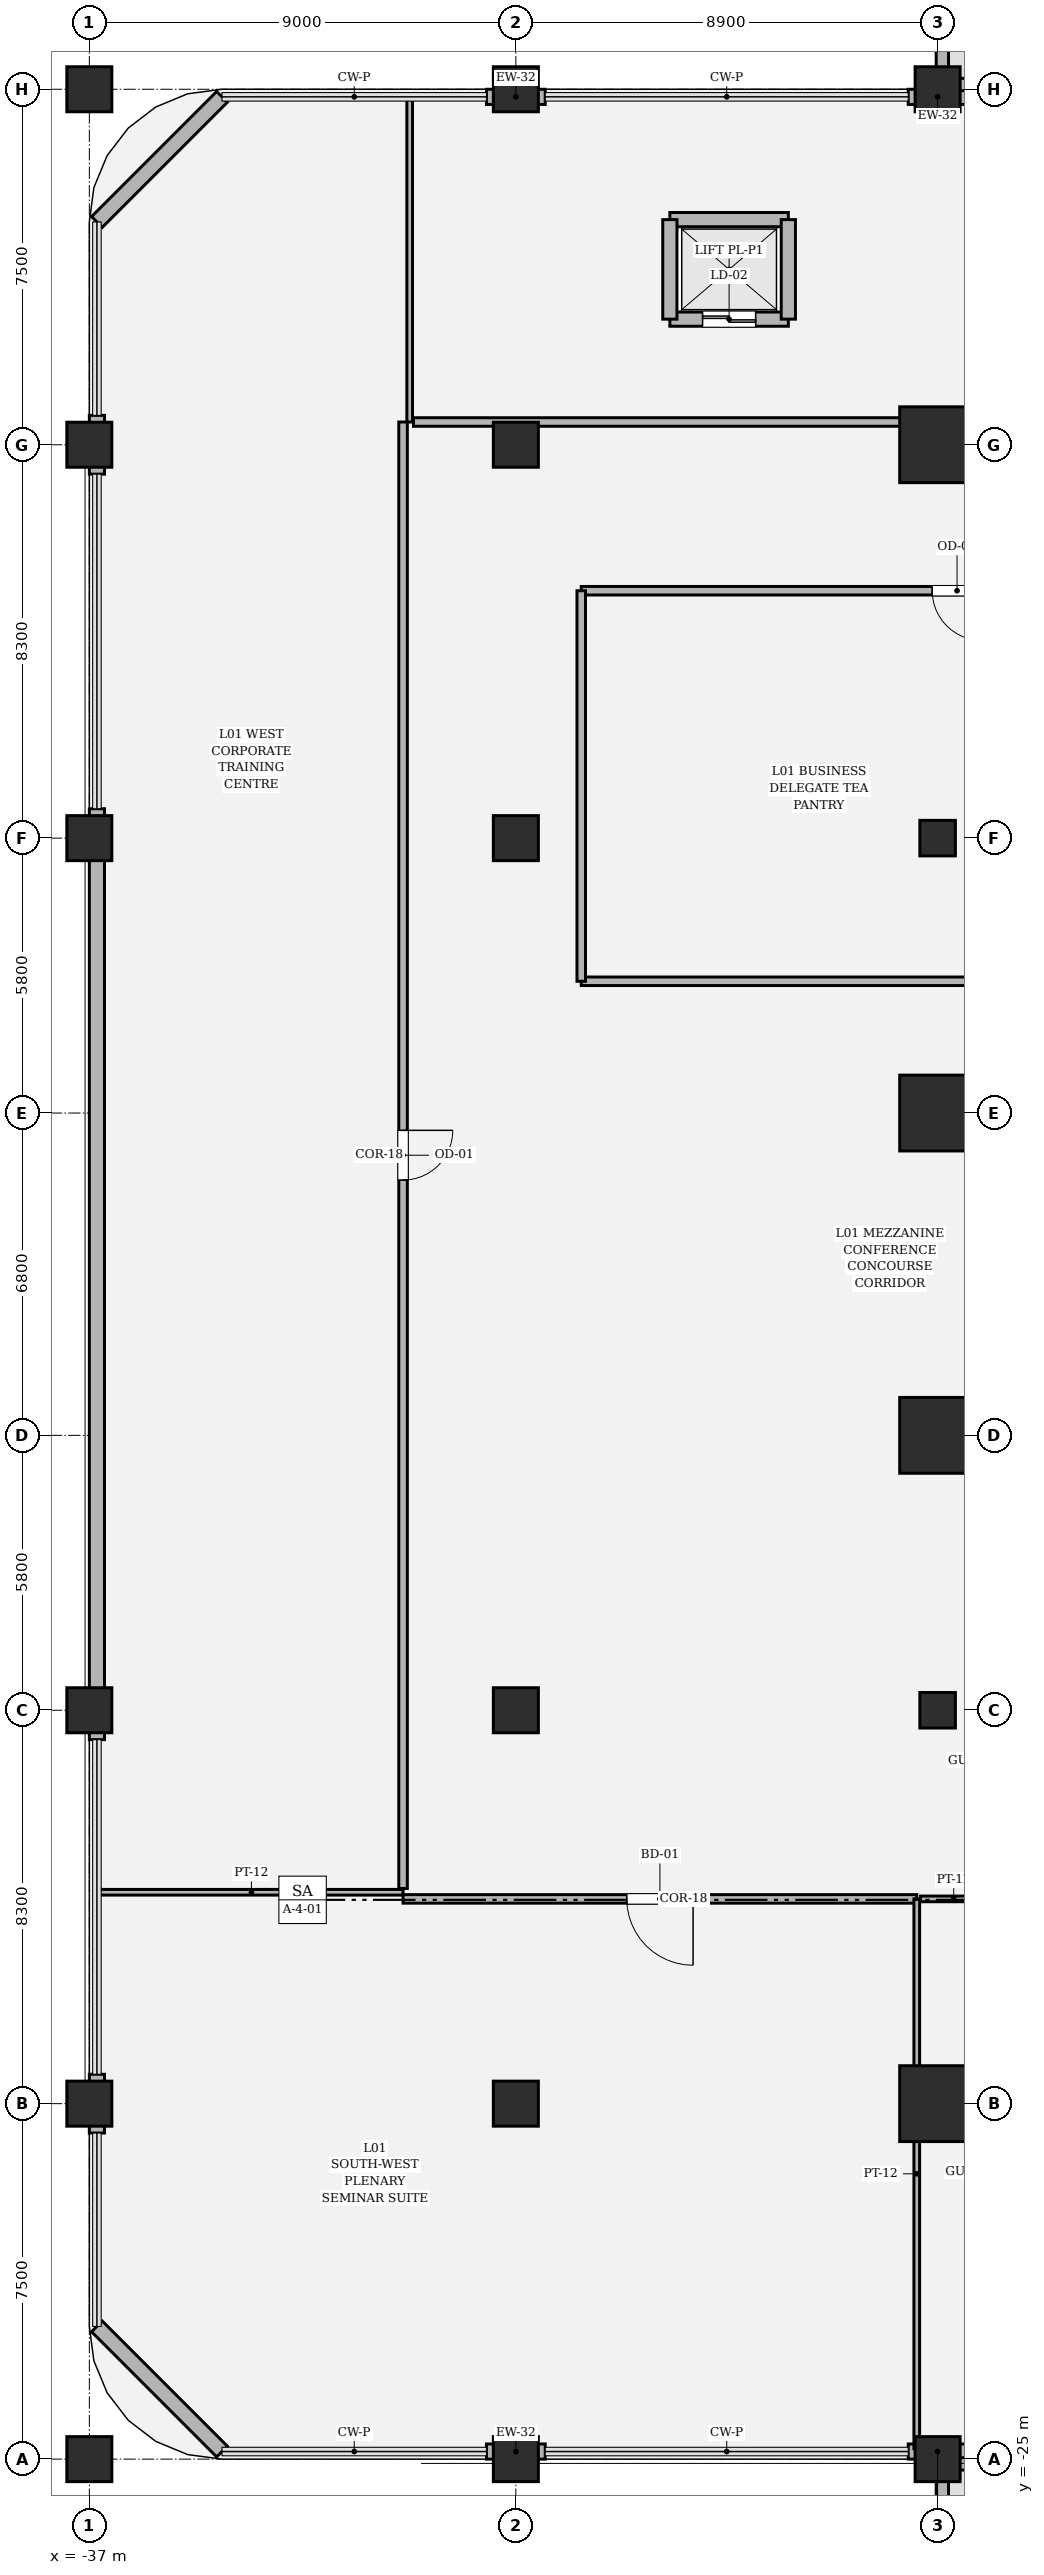
"""IFC4 building model, lengths in metres.
Left out: names, types, materials, properties, quantities, classifications, styles, units other than length and angle.
Written with IfcOpenShell. Run it as: python <this file> out.ifc"""

import sys

from ifc_helpers import new_model, si_unit, direction, frame, frame_2d, origin, origin_2d, place, context, subcontext, project, spatial, rectangle, hollow_rectangle, circle, extrude, element, fill, save


model = new_model("IFC4")
c1 = context("Model", 3, precision=1e-05, world=origin(), true_north=direction((0.0, 1.0)))
c2 = subcontext(c1, "Body", "Model", "MODEL_VIEW")
j1 = project(units=[si_unit("LENGTHUNIT", "METRE"), si_unit("PLANEANGLEUNIT", "RADIAN")], contexts=[c1])
p1 = place(None, origin())
s1 = spatial("IfcSite", under=j1, at=p1, CompositionType="ELEMENT")
p2 = place(p1, origin())
s2 = spatial("IfcBuilding", under=s1, at=p2, CompositionType="ELEMENT")
p3 = place(p2, frame((0.0, 0.0, 6.0)))
s3 = spatial("IfcBuildingStorey", under=s2, at=p3, CompositionType="ELEMENT", Elevation=6.0)
for number, where, z_axis, x_axis in (
    (1, (-19.1, -17.5, 0.0), (0.0, 0.0, 1.0), (1.0, 0.0, 0.0)),
    (2, (-19.1, 17.5, 0.0), (0.0, 0.0, 1.0), (1.0, 0.0, 0.0)),
    (3, (-19.1, 3.4, 0.0), (0.0, 0.0, 1.0), (1.0, 0.0, 0.0)),
    (4, (-19.1, -3.4, 0.0), (0.0, 0.0, 1.0), (1.0, 0.0, 0.0)),
):
    element("IfcColumn", number, at=place(p3, frame(where, z_axis=z_axis, x_axis=x_axis)), inside=s3, PredefinedType="COLUMN", context=c2, shape_type="SweptSolid", body=[
        extrude(hollow_rectangle(XDim=1.6, YDim=1.6, WallThickness=0.05, at=origin_2d()), origin(), (0.0, 0.0, 1.0), 5.4),
    ])
for number, where, z_axis, x_axis in (
    (5, (-37.0, -25.0, 0.0), (0.0, 0.0, 1.0), (1.0, 0.0, 0.0)),
    (6, (-28.0, -25.0, 0.0), (0.0, 0.0, 1.0), (1.0, 0.0, 0.0)),
    (7, (-19.1, -25.0, 0.0), (0.0, 0.0, 1.0), (1.0, 0.0, 0.0)),
    (8, (-37.0, -17.5, 0.0), (0.0, 0.0, 1.0), (1.0, 0.0, 0.0)),
    (9, (-28.0, -17.5, 0.0), (0.0, 0.0, 1.0), (1.0, 0.0, 0.0)),
    (10, (-37.0, -9.2, 0.0), (0.0, 0.0, 1.0), (1.0, 0.0, 0.0)),
    (11, (-37.0, 9.2, 0.0), (0.0, 0.0, 1.0), (1.0, 0.0, 0.0)),
    (12, (-37.0, 17.5, 0.0), (0.0, 0.0, 1.0), (1.0, 0.0, 0.0)),
    (13, (-28.0, 17.5, 0.0), (0.0, 0.0, 1.0), (1.0, 0.0, 0.0)),
    (14, (-37.0, 25.0, 0.0), (0.0, 0.0, 1.0), (1.0, 0.0, 0.0)),
    (15, (-28.0, 25.0, 0.0), (0.0, 0.0, 1.0), (1.0, 0.0, 0.0)),
    (16, (-19.1, 25.0, 0.0), (0.0, 0.0, 1.0), (1.0, 0.0, 0.0)),
    (17, (-28.0, -9.2, 0.0), (0.0, 0.0, 1.0), (1.0, 0.0, 0.0)),
    (18, (-28.0, 9.2, 0.0), (0.0, 0.0, 1.0), (1.0, 0.0, 0.0)),
):
    element("IfcColumn", number, at=place(p3, frame(where, z_axis=z_axis, x_axis=x_axis)), inside=s3, PredefinedType="COLUMN", context=c2, shape_type="SweptSolid", body=[
        extrude(rectangle(XDim=0.95, YDim=0.95, at=origin_2d()), origin(), (0.0, 0.0, 1.0), 5.4),
    ])
for number, where, z_axis, x_axis in (
    (19, (-19.1, -9.2, 0.0), (0.0, 0.0, 1.0), (1.0, 0.0, 0.0)),
    (20, (-19.1, 9.2, 0.0), (0.0, 0.0, 1.0), (1.0, 0.0, 0.0)),
):
    element("IfcColumn", number, at=place(p3, frame(where, z_axis=z_axis, x_axis=x_axis)), inside=s3, PredefinedType="PILASTER", context=c2, shape_type="SweptSolid", body=[
        extrude(circle(Radius=0.375, at=origin_2d()), origin(), (0.0, 0.0, 1.0), 5.4),
    ])
for number, where, z_axis, x_axis in (
    (21, (-28.62, -24.84, 0.0), (0.0, 0.0, 1.0), (1.0, 0.0, 0.0)),
    (22, (-27.38, 24.84, 0.0), (0.0, 0.0, 1.0), (-1.0, 0.0, 0.0)),
):
    element("IfcWall", number, at=place(p3, frame(where, z_axis=z_axis, x_axis=x_axis)), inside=s3, PredefinedType="SOLIDWALL", context=c2, shape_type="SweptSolid", body=[
        extrude(rectangle(XDim=1.24, YDim=0.32, at=frame_2d((0.62, 0.0))), origin(), (0.0, 0.0, 1.0), 4.414),
    ])
for number, where, z_axis, x_axis in (
    (23, (-19.72, -24.84, 0.0), (0.0, 0.0, 1.0), (1.0, 0.0, 0.0)),
    (24, (-18.48, 24.84, 0.0), (0.0, 0.0, 1.0), (-1.0, 0.0, 0.0)),
):
    element("IfcWall", number, at=place(p3, frame(where, z_axis=z_axis, x_axis=x_axis)), inside=s3, PredefinedType="SOLIDWALL", context=c2, shape_type="SweptSolid", body=[
        extrude(rectangle(XDim=1.24, YDim=0.32, at=frame_2d((0.62, 0.0))), origin(), (0.0, 0.0, 1.0), 4.414),
    ])
p4 = place(p3, frame((-36.84, -9.82, 0.0), z_axis=(0.0, 0.0, 1.0), x_axis=(0.0, 1.0, 0.0)))
e25 = element("IfcWall", 25, at=p4, inside=s3, PredefinedType="SOLIDWALL", context=c2, shape_type="SweptSolid", body=[
    extrude(rectangle(XDim=19.64, YDim=0.32, at=frame_2d((9.82, 0.0))), origin(), (0.0, 0.0, 1.0), 4.414),
])
for number, where, z_axis, x_axis in (
    (26, (-36.84, -18.12, 0.0), (0.0, 0.0, 1.0), (0.0, 1.0, 0.0)),
    (27, (-36.84, 16.88, 0.0), (0.0, 0.0, 1.0), (0.0, 1.0, 0.0)),
):
    element("IfcWall", number, at=place(p3, frame(where, z_axis=z_axis, x_axis=x_axis)), inside=s3, PredefinedType="SOLIDWALL", context=c2, shape_type="SweptSolid", body=[
        extrude(rectangle(XDim=1.24, YDim=0.32, at=frame_2d((0.62, 0.0))), origin(), (0.0, 0.0, 1.0), 4.414),
    ])
for number, where, z_axis, x_axis in (
    (28, (-34.2, -24.84, 0.0), (0.0, 0.0, 1.0), (-0.707, 0.707, 0.0)),
    (29, (-36.84, 22.2, 0.0), (0.0, 0.0, 1.0), (0.707, 0.707, 0.0)),
):
    element("IfcWall", number, at=place(p3, frame(where, z_axis=z_axis, x_axis=x_axis)), inside=s3, PredefinedType="SOLIDWALL", context=c2, shape_type="SweptSolid", body=[
        extrude(rectangle(XDim=3.734, YDim=0.32, at=frame_2d((1.867, 0.0))), origin(), (0.0, 0.0, 1.0), 4.564),
    ])
p5 = place(p3, frame((-19.0, -25.1, 0.0), z_axis=(0.0, 0.0, 1.0), x_axis=(0.0, -1.0, 0.0)))
e30 = element("IfcWall", 30, at=p5, inside=s3, PredefinedType="PARAPET", context=c2, shape_type="SweptSolid", body=[
    extrude(rectangle(XDim=2.52, YDim=0.26, at=frame_2d((1.26, 0.0))), origin(), (0.0, 0.0, 1.0), 1.15),
])
for number, where, z_axis, x_axis in (
    (31, (19.0, -25.1, 0.0), (0.0, 0.0, 1.0), (-1.0, 0.0, 0.0)),
    (32, (-19.0, 25.1, 0.0), (0.0, 0.0, 1.0), (1.0, 0.0, 0.0)),
):
    element("IfcWall", number, at=place(p3, frame(where, z_axis=z_axis, x_axis=x_axis)), inside=s3, PredefinedType="PARAPET", context=c2, shape_type="SweptSolid", body=[
        extrude(rectangle(XDim=38.0, YDim=0.26, at=frame_2d((19.0, 0.0))), origin(), (0.0, 0.0, 1.0), 1.15),
    ])
p6 = place(p3, frame((-19.0, 27.62, 0.0), z_axis=(0.0, 0.0, 1.0), x_axis=(0.0, -1.0, 0.0)))
e33 = element("IfcWall", 33, at=p6, inside=s3, PredefinedType="PARAPET", context=c2, shape_type="SweptSolid", body=[
    extrude(rectangle(XDim=2.52, YDim=0.26, at=frame_2d((1.26, 0.0))), origin(), (0.0, 0.0, 1.0), 1.15),
])
p7 = place(p3, frame((-24.75, 20.15, 0.0), z_axis=(0.0, 0.0, 1.0), x_axis=(1.0, 0.0, 0.0)))
e34 = element("IfcWall", 34, at=p7, inside=s3, PredefinedType="SOLIDWALL", context=c2, shape_type="SweptSolid", body=[
    extrude(rectangle(XDim=2.5, YDim=0.3, at=frame_2d((1.25, 0.0))), origin(), (0.0, 0.0, 1.0), 5.12),
])
p8 = place(p7, frame((0.69, 0.0, 0.0)))
e35 = element("IfcOpeningElement", 35, at=p8, cuts=e34, PredefinedType="OPENING", context=c2, shape_type="SweptSolid", body=[
    extrude(rectangle(XDim=1.12, YDim=2.25, at=frame_2d((0.56, 1.125))), frame((0.0, 0.16, 0.0), z_axis=(0.0, -1.0, 0.0), x_axis=(1.0, 0.0, 0.0)), (0.0, 0.0, 1.0), 0.32),
])
p9 = place(p3, frame((-24.75, 22.25, 0.0), z_axis=(0.0, 0.0, 1.0), x_axis=(1.0, 0.0, 0.0)))
e36 = element("IfcWall", 36, at=p9, inside=s3, PredefinedType="SOLIDWALL", context=c2, shape_type="SweptSolid", body=[
    extrude(rectangle(XDim=2.5, YDim=0.3, at=frame_2d((1.25, 0.0))), origin(), (0.0, 0.0, 1.0), 5.12),
])
for number, where, z_axis, x_axis in (
    (37, (-24.75, 20.15, 0.0), (0.0, 0.0, 1.0), (0.0, 1.0, 0.0)),
    (38, (-22.25, 20.15, 0.0), (0.0, 0.0, 1.0), (0.0, 1.0, 0.0)),
):
    element("IfcWall", number, at=place(p3, frame(where, z_axis=z_axis, x_axis=x_axis)), inside=s3, PredefinedType="SOLIDWALL", context=c2, shape_type="SweptSolid", body=[
        extrude(rectangle(XDim=2.1, YDim=0.3, at=frame_2d((1.05, 0.0))), origin(), (0.0, 0.0, 1.0), 5.12),
    ])
p10 = place(p3, frame((-36.78, -13.04, 0.0), z_axis=(0.0, 0.0, 1.0), x_axis=(1.0, 0.0, 0.0)))
e39 = element("IfcWall", 39, at=p10, inside=s3, PredefinedType="PARTITIONING", context=c2, shape_type="SweptSolid", body=[
    extrude(rectangle(XDim=6.4, YDim=0.12, at=frame_2d((3.2, 0.0))), origin(), (0.0, 0.0, 1.0), 5.12),
])
p11 = place(p3, frame((-30.38, -13.18, 0.0), z_axis=(0.0, 0.0, 1.0), x_axis=(1.0, 0.0, 0.0)))
e40 = element("IfcWall", 40, at=p11, inside=s3, PredefinedType="PARTITIONING", context=c2, shape_type="SweptSolid", body=[
    extrude(rectangle(XDim=10.84, YDim=0.18, at=frame_2d((5.42, 0.0))), origin(), (0.0, 0.0, 1.0), 4.414),
])
p12 = place(p11, frame((4.72, 0.0, 0.0)))
e41 = element("IfcOpeningElement", 41, at=p12, cuts=e40, PredefinedType="OPENING", context=c2, shape_type="SweptSolid", body=[
    extrude(rectangle(XDim=1.4, YDim=2.25, at=frame_2d((0.7, 1.125))), frame((0.0, 0.1, 0.0), z_axis=(0.0, -1.0, 0.0), x_axis=(1.0, 0.0, 0.0)), (0.0, 0.0, 1.0), 0.2),
])
p13 = place(p3, frame((-19.54, -13.18, 0.0), z_axis=(0.0, 0.0, 1.0), x_axis=(0.0, -1.0, 0.0)))
e42 = element("IfcWall", 42, at=p13, inside=s3, PredefinedType="PARTITIONING", context=c2, shape_type="SweptSolid", body=[
    extrude(rectangle(XDim=11.6, YDim=0.12, at=frame_2d((5.8, 0.0))), origin(), (0.0, 0.0, 1.0), 4.414),
])
p14 = place(p3, frame((-19.46, -13.18, 0.0), z_axis=(0.0, 0.0, 1.0), x_axis=(1.0, 0.0, 0.0)))
e43 = element("IfcWall", 43, at=p14, inside=s3, PredefinedType="PARTITIONING", context=c2, shape_type="SweptSolid", body=[
    extrude(rectangle(XDim=1.4, YDim=0.12, at=frame_2d((0.7, 0.0))), origin(), (0.0, 0.0, 1.0), 4.414),
])
p15 = place(p3, frame((-30.24, 24.78, 0.0), z_axis=(0.0, 0.0, 1.0), x_axis=(0.0, -1.0, 0.0)))
e44 = element("IfcWall", 44, at=p15, inside=s3, PredefinedType="PARTITIONING", context=c2, shape_type="SweptSolid", body=[
    extrude(rectangle(XDim=6.8, YDim=0.12, at=frame_2d((3.4, 0.0))), origin(), (0.0, 0.0, 1.0), 5.12),
])
p16 = place(p3, frame((-30.38, 17.98, 0.0), z_axis=(0.0, 0.0, 1.0), x_axis=(0.0, -1.0, 0.0)))
e45 = element("IfcWall", 45, at=p16, inside=s3, PredefinedType="PARTITIONING", context=c2, shape_type="SweptSolid", body=[
    extrude(rectangle(XDim=30.94, YDim=0.18, at=frame_2d((15.47, 0.0))), origin(), (0.0, 0.0, 1.0), 4.414),
])
p17 = place(p16, frame((14.945, 0.0, 0.0)))
e46 = element("IfcOpeningElement", 46, at=p17, cuts=e45, PredefinedType="OPENING", context=c2, shape_type="SweptSolid", body=[
    extrude(rectangle(XDim=1.05, YDim=2.2, at=frame_2d((0.525, 1.1))), frame((0.0, 0.1, 0.0), z_axis=(0.0, -1.0, 0.0), x_axis=(1.0, 0.0, 0.0)), (0.0, 0.0, 1.0), 0.2),
])
p18 = place(p3, frame((-16.46, 17.98, 0.0), z_axis=(0.0, 0.0, 1.0), x_axis=(-1.0, 0.0, 0.0)))
e47 = element("IfcWall", 47, at=p18, inside=s3, PredefinedType="PARTITIONING", context=c2, shape_type="SweptSolid", body=[
    extrude(rectangle(XDim=13.7, YDim=0.18, at=frame_2d((6.85, 0.0))), origin(), (0.0, 0.0, 1.0), 4.414),
])
p19 = place(p3, frame((-26.62, 14.42, 0.0), z_axis=(0.0, 0.0, 1.0), x_axis=(1.0, 0.0, 0.0)))
e48 = element("IfcWall", 48, at=p19, inside=s3, PredefinedType="PARTITIONING", context=c2, shape_type="SweptSolid", body=[
    extrude(rectangle(XDim=15.86, YDim=0.18, at=frame_2d((7.93, 0.0))), origin(), (0.0, 0.0, 1.0), 4.414),
])
p20 = place(p19, frame((7.405, 0.0, 0.0)))
e49 = element("IfcOpeningElement", 49, at=p20, cuts=e48, PredefinedType="OPENING", context=c2, shape_type="SweptSolid", body=[
    extrude(rectangle(XDim=1.05, YDim=2.2, at=frame_2d((0.525, 1.1))), frame((0.0, 0.1, 0.0), z_axis=(0.0, -1.0, 0.0), x_axis=(1.0, 0.0, 0.0)), (0.0, 0.0, 1.0), 0.2),
])
p21 = place(p3, frame((-10.76, 6.18, 0.0), z_axis=(0.0, 0.0, 1.0), x_axis=(-1.0, 0.0, 0.0)))
e50 = element("IfcWall", 50, at=p21, inside=s3, PredefinedType="PARTITIONING", context=c2, shape_type="SweptSolid", body=[
    extrude(rectangle(XDim=15.86, YDim=0.18, at=frame_2d((7.93, 0.0))), origin(), (0.0, 0.0, 1.0), 4.414),
])
p22 = place(p3, frame((-26.62, 6.18, 0.0), z_axis=(0.0, 0.0, 1.0), x_axis=(0.0, 1.0, 0.0)))
e51 = element("IfcWall", 51, at=p22, inside=s3, PredefinedType="PARTITIONING", context=c2, shape_type="SweptSolid", body=[
    extrude(rectangle(XDim=8.24, YDim=0.18, at=frame_2d((4.12, 0.0))), origin(), (0.0, 0.0, 1.0), 4.414),
])
p23 = place(p8, origin())
e52 = element("IfcDoor", 52, at=p23, inside=s3, OperationType="DOUBLE_DOOR_SLIDING", PredefinedType="DOOR", context=c2, shape_type="SweptSolid", body=[
    extrude(rectangle(XDim=1.12, YDim=2.25, at=frame_2d((0.56, 1.125))), frame((0.0, 0.025, 0.0), z_axis=(0.0, -1.0, 0.0), x_axis=(1.0, 0.0, 0.0)), (0.0, 0.0, 1.0), 0.05),
])
fill(e35, e52)
p24 = place(p12, origin())
e53 = element("IfcDoor", 53, at=p24, inside=s3, OperationType="SINGLE_SWING_RIGHT", PredefinedType="DOOR", context=c2, shape_type="SweptSolid", body=[
    extrude(rectangle(XDim=1.4, YDim=2.25, at=frame_2d((0.7, 1.125))), frame((0.0, 0.025, 0.0), z_axis=(0.0, -1.0, 0.0), x_axis=(1.0, 0.0, 0.0)), (0.0, 0.0, 1.0), 0.05),
])
fill(e41, e53)
p25 = place(p17, origin())
e54 = element("IfcDoor", 54, at=p25, inside=s3, OperationType="SINGLE_SWING_LEFT", PredefinedType="DOOR", context=c2, shape_type="SweptSolid", body=[
    extrude(rectangle(XDim=1.05, YDim=2.2, at=frame_2d((0.525, 1.1))), frame((0.0, 0.025, 0.0), z_axis=(0.0, -1.0, 0.0), x_axis=(1.0, 0.0, 0.0)), (0.0, 0.0, 1.0), 0.05),
])
fill(e46, e54)
p26 = place(p20, origin())
e55 = element("IfcDoor", 55, at=p26, inside=s3, OperationType="SINGLE_SWING_RIGHT", PredefinedType="DOOR", context=c2, shape_type="SweptSolid", body=[
    extrude(rectangle(XDim=1.05, YDim=2.2, at=frame_2d((0.525, 1.1))), frame((0.0, 0.025, 0.0), z_axis=(0.0, -1.0, 0.0), x_axis=(1.0, 0.0, 0.0)), (0.0, 0.0, 1.0), 0.05),
])
fill(e49, e55)
save(model, sys.argv[1])
